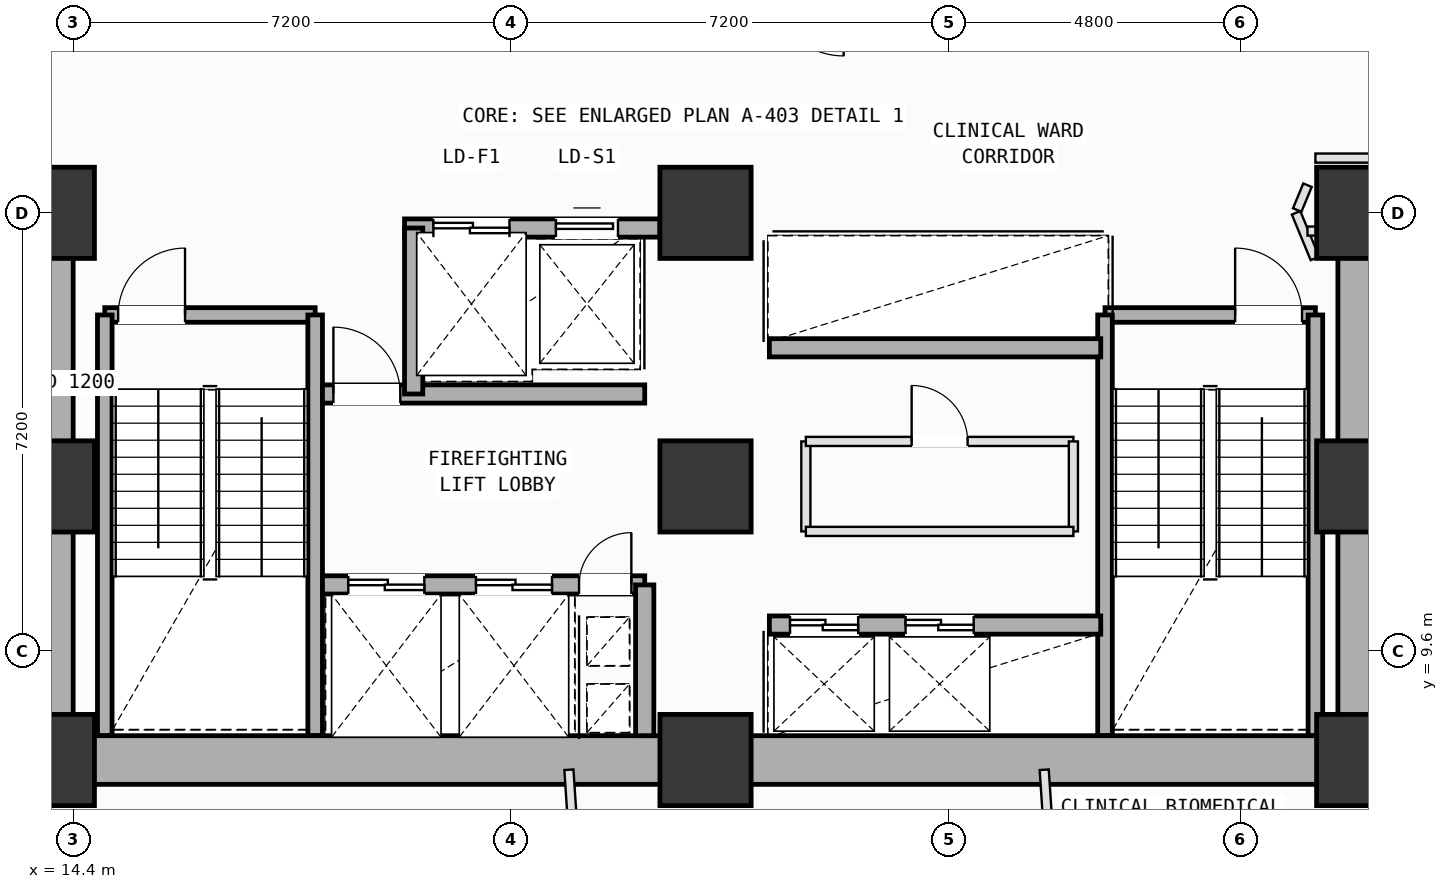
"""IFC4 building model, lengths in metres.
Left out: names, types, materials, properties, quantities, classifications, styles, units other than length and angle.
Written with IfcOpenShell. Run it as: python <this file> out.ifc"""

import sys

from ifc_helpers import new_model, si_unit, direction, frame, frame_2d, origin, origin_2d, place, context, subcontext, project, spatial, rectangle, extrude, element, fill, save


model = new_model("IFC4")
c1 = context("Model", 3, precision=1e-05, world=origin(), true_north=direction((0.0, 1.0)))
c2 = subcontext(c1, "Body", "Model", "MODEL_VIEW")
j1 = project(units=[si_unit("LENGTHUNIT", "METRE"), si_unit("PLANEANGLEUNIT", "RADIAN")], contexts=[c1])
p1 = place(None, origin())
s1 = spatial("IfcSite", under=j1, at=p1, CompositionType="ELEMENT")
p2 = place(p1, origin())
s2 = spatial("IfcBuilding", under=s1, at=p2, CompositionType="ELEMENT")
p3 = place(p2, frame((0.0, 0.0, 39.0)))
s3 = spatial("IfcBuildingStorey", under=s2, at=p3, CompositionType="ELEMENT", Elevation=39.0)
for number, where, z_axis, x_axis in (
    (1, (14.0, 7.8, 0.0), (0.0, 0.0, 1.0), (1.0, 0.0, 0.0)),
    (2, (14.0, 12.3, 0.0), (0.0, 0.0, 1.0), (1.0, 0.0, 0.0)),
    (3, (14.0, 16.8, 0.0), (0.0, 0.0, 1.0), (1.0, 0.0, 0.0)),
    (4, (24.8, 7.8, 0.0), (0.0, 0.0, 1.0), (1.0, 0.0, 0.0)),
    (5, (24.8, 12.3, 0.0), (0.0, 0.0, 1.0), (1.0, 0.0, 0.0)),
    (6, (24.8, 16.8, 0.0), (0.0, 0.0, 1.0), (1.0, 0.0, 0.0)),
    (7, (35.6, 7.8, 0.0), (0.0, 0.0, 1.0), (1.0, 0.0, 0.0)),
    (8, (35.6, 12.3, 0.0), (0.0, 0.0, 1.0), (1.0, 0.0, 0.0)),
    (9, (35.6, 16.8, 0.0), (0.0, 0.0, 1.0), (1.0, 0.0, 0.0)),
):
    element("IfcColumn", number, at=place(p3, frame(where, z_axis=z_axis, x_axis=x_axis)), inside=s3, PredefinedType="COLUMN", context=c2, shape_type="SweptSolid", body=[
        extrude(rectangle(XDim=1.5, YDim=1.5, at=origin_2d()), origin(), (0.0, 0.0, 1.0), 4.0),
    ])
p4 = place(p3, frame((14.92, 15.12, 0.0), z_axis=(0.0, 0.0, 1.0), x_axis=(1.0, 0.0, 0.0)))
e10 = element("IfcWall", 10, at=p4, inside=s3, PredefinedType="SOLIDWALL", context=c2, shape_type="SweptSolid", body=[
    extrude(rectangle(XDim=3.46, YDim=0.24, at=frame_2d((1.73, 0.0))), origin(), (0.0, 0.0, 1.0), 3.78),
])
p5 = place(p4, frame((0.22, 0.0, 0.0)))
e11 = element("IfcOpeningElement", 11, at=p5, cuts=e10, PredefinedType="OPENING", context=c2, shape_type="SweptSolid", body=[
    extrude(rectangle(XDim=1.1, YDim=2.15, at=frame_2d((0.55, 1.075))), frame((0.0, 0.13, 0.0), z_axis=(0.0, -1.0, 0.0), x_axis=(1.0, 0.0, 0.0)), (0.0, 0.0, 1.0), 0.26),
])
for number, where, z_axis, x_axis in (
    (12, (18.38, 15.12, 0.0), (0.0, 0.0, 1.0), (0.0, -1.0, 0.0)),
    (13, (14.92, 8.2, 0.0), (0.0, 0.0, 1.0), (0.0, 1.0, 0.0)),
):
    element("IfcWall", number, at=place(p3, frame(where, z_axis=z_axis, x_axis=x_axis)), inside=s3, PredefinedType="SOLIDWALL", context=c2, shape_type="SweptSolid", body=[
        extrude(rectangle(XDim=6.92, YDim=0.24, at=frame_2d((3.46, 0.0))), origin(), (0.0, 0.0, 1.0), 3.78),
    ])
p6 = place(p3, frame((31.37, 15.12, 0.0), z_axis=(0.0, 0.0, 1.0), x_axis=(1.0, 0.0, 0.0)))
e14 = element("IfcWall", 14, at=p6, inside=s3, PredefinedType="SOLIDWALL", context=c2, shape_type="SweptSolid", body=[
    extrude(rectangle(XDim=3.46, YDim=0.24, at=frame_2d((1.73, 0.0))), origin(), (0.0, 0.0, 1.0), 3.78),
])
p7 = place(p6, frame((2.14, 0.0, 0.0)))
e15 = element("IfcOpeningElement", 15, at=p7, cuts=e14, PredefinedType="OPENING", context=c2, shape_type="SweptSolid", body=[
    extrude(rectangle(XDim=1.1, YDim=2.15, at=frame_2d((0.55, 1.075))), frame((0.0, 0.13, 0.0), z_axis=(0.0, -1.0, 0.0), x_axis=(1.0, 0.0, 0.0)), (0.0, 0.0, 1.0), 0.26),
])
for number, where, z_axis, x_axis in (
    (16, (34.83, 15.12, 0.0), (0.0, 0.0, 1.0), (0.0, -1.0, 0.0)),
    (17, (31.37, 8.2, 0.0), (0.0, 0.0, 1.0), (0.0, 1.0, 0.0)),
):
    element("IfcWall", number, at=place(p3, frame(where, z_axis=z_axis, x_axis=x_axis)), inside=s3, PredefinedType="SOLIDWALL", context=c2, shape_type="SweptSolid", body=[
        extrude(rectangle(XDim=6.92, YDim=0.24, at=frame_2d((3.46, 0.0))), origin(), (0.0, 0.0, 1.0), 3.78),
    ])
for number, where, z_axis, x_axis in (
    (18, (14.0, 7.8, 0.0), (0.0, 0.0, 1.0), (1.0, 0.0, 0.0)),
    (19, (24.8, 7.8, 0.0), (0.0, 0.0, 1.0), (1.0, 0.0, 0.0)),
):
    element("IfcWall", number, at=place(p3, frame(where, z_axis=z_axis, x_axis=x_axis)), inside=s3, PredefinedType="SHEAR", context=c2, shape_type="SweptSolid", body=[
        extrude(rectangle(XDim=10.8, YDim=0.8, at=frame_2d((5.4, 0.0))), origin(), (0.0, 0.0, 1.0), 3.78),
    ])
for number, where, z_axis, x_axis in (
    (20, (35.6, 7.8, 0.0), (0.0, 0.0, 1.0), (0.0, 1.0, 0.0)),
    (21, (14.0, 16.8, 0.0), (0.0, 0.0, 1.0), (0.0, -1.0, 0.0)),
):
    element("IfcWall", number, at=place(p3, frame(where, z_axis=z_axis, x_axis=x_axis)), inside=s3, PredefinedType="SHEAR", context=c2, shape_type="SweptSolid", body=[
        extrude(rectangle(XDim=9.0, YDim=0.8, at=frame_2d((4.5, 0.0))), origin(), (0.0, 0.0, 1.0), 3.78),
    ])
p8 = place(p3, frame((19.85, 16.55, 0.0), z_axis=(0.0, 0.0, 1.0), x_axis=(1.0, 0.0, 0.0)))
e22 = element("IfcWall", 22, at=p8, inside=s3, PredefinedType="SOLIDWALL", context=c2, shape_type="SweptSolid", body=[
    extrude(rectangle(XDim=4.2, YDim=0.3, at=frame_2d((2.1, 0.0))), origin(), (0.0, 0.0, 1.0), 3.78),
])
p9 = place(p8, frame((0.475, 0.0, 0.0)))
e23 = element("IfcOpeningElement", 23, at=p9, cuts=e22, PredefinedType="OPENING", context=c2, shape_type="SweptSolid", body=[
    extrude(rectangle(XDim=1.25, YDim=2.18, at=frame_2d((0.625, 1.09))), frame((0.0, 0.16, 0.0), z_axis=(0.0, -1.0, 0.0), x_axis=(1.0, 0.0, 0.0)), (0.0, 0.0, 1.0), 0.32),
])
p10 = place(p8, frame((2.49, 0.0, 0.0)))
e24 = element("IfcOpeningElement", 24, at=p10, cuts=e22, PredefinedType="OPENING", context=c2, shape_type="SweptSolid", body=[
    extrude(rectangle(XDim=1.02, YDim=2.12, at=frame_2d((0.51, 1.06))), frame((0.0, 0.16, 0.0), z_axis=(0.0, -1.0, 0.0), x_axis=(1.0, 0.0, 0.0)), (0.0, 0.0, 1.0), 0.32),
])
p11 = place(p3, frame((18.5, 10.68, 0.0), z_axis=(0.0, 0.0, 1.0), x_axis=(1.0, 0.0, 0.0)))
e25 = element("IfcWall", 25, at=p11, inside=s3, PredefinedType="SOLIDWALL", context=c2, shape_type="SweptSolid", body=[
    extrude(rectangle(XDim=5.3, YDim=0.3, at=frame_2d((2.65, 0.0))), origin(), (0.0, 0.0, 1.0), 3.78),
])
p12 = place(p11, frame((4.22, 0.0, 0.0)))
e26 = element("IfcOpeningElement", 26, at=p12, cuts=e25, PredefinedType="OPENING", context=c2, shape_type="SweptSolid", body=[
    extrude(rectangle(XDim=0.86, YDim=2.06, at=frame_2d((0.43, 1.03))), frame((0.0, 0.16, 0.0), z_axis=(0.0, -1.0, 0.0), x_axis=(1.0, 0.0, 0.0)), (0.0, 0.0, 1.0), 0.32),
])
p13 = place(p11, frame((0.425, 0.0, 0.0)))
e27 = element("IfcOpeningElement", 27, at=p13, cuts=e25, PredefinedType="OPENING", context=c2, shape_type="SweptSolid", body=[
    extrude(rectangle(XDim=1.25, YDim=2.18, at=frame_2d((0.625, 1.09))), frame((0.0, 0.16, 0.0), z_axis=(0.0, -1.0, 0.0), x_axis=(1.0, 0.0, 0.0)), (0.0, 0.0, 1.0), 0.32),
])
p14 = place(p11, frame((2.525, 0.0, 0.0)))
e28 = element("IfcOpeningElement", 28, at=p14, cuts=e25, PredefinedType="OPENING", context=c2, shape_type="SweptSolid", body=[
    extrude(rectangle(XDim=1.25, YDim=2.18, at=frame_2d((0.625, 1.09))), frame((0.0, 0.16, 0.0), z_axis=(0.0, -1.0, 0.0), x_axis=(1.0, 0.0, 0.0)), (0.0, 0.0, 1.0), 0.32),
])
p15 = place(p3, frame((18.5, 13.82, 0.0), z_axis=(0.0, 0.0, 1.0), x_axis=(1.0, 0.0, 0.0)))
e29 = element("IfcWall", 29, at=p15, inside=s3, PredefinedType="SOLIDWALL", context=c2, shape_type="SweptSolid", body=[
    extrude(rectangle(XDim=5.3, YDim=0.3, at=frame_2d((2.65, 0.0))), origin(), (0.0, 0.0, 1.0), 3.78),
])
p16 = place(p15, frame((0.18, 0.0, 0.0)))
e30 = element("IfcOpeningElement", 30, at=p16, cuts=e29, PredefinedType="OPENING", context=c2, shape_type="SweptSolid", body=[
    extrude(rectangle(XDim=1.1, YDim=2.15, at=frame_2d((0.55, 1.075))), frame((0.0, 0.16, 0.0), z_axis=(0.0, -1.0, 0.0), x_axis=(1.0, 0.0, 0.0)), (0.0, 0.0, 1.0), 0.32),
])
p17 = place(p3, frame((23.8, 8.2, 0.0), z_axis=(0.0, 0.0, 1.0), x_axis=(0.0, 1.0, 0.0)))
e31 = element("IfcWall", 31, at=p17, inside=s3, PredefinedType="SOLIDWALL", context=c2, shape_type="SweptSolid", body=[
    extrude(rectangle(XDim=2.48, YDim=0.3, at=frame_2d((1.24, 0.0))), origin(), (0.0, 0.0, 1.0), 3.78),
])
p18 = place(p3, frame((20.0, 13.82, 0.0), z_axis=(0.0, 0.0, 1.0), x_axis=(0.0, 1.0, 0.0)))
e32 = element("IfcWall", 32, at=p18, inside=s3, PredefinedType="SOLIDWALL", context=c2, shape_type="SweptSolid", body=[
    extrude(rectangle(XDim=2.73, YDim=0.3, at=frame_2d((1.365, 0.0))), origin(), (0.0, 0.0, 1.0), 3.78),
])
p19 = place(p3, frame((25.85, 10.02, 0.0), z_axis=(0.0, 0.0, 1.0), x_axis=(1.0, 0.0, 0.0)))
e33 = element("IfcWall", 33, at=p19, inside=s3, PredefinedType="SOLIDWALL", context=c2, shape_type="SweptSolid", body=[
    extrude(rectangle(XDim=5.45, YDim=0.3, at=frame_2d((2.725, 0.0))), origin(), (0.0, 0.0, 1.0), 3.78),
])
p20 = place(p19, frame((0.34, 0.0, 0.0)))
e34 = element("IfcOpeningElement", 34, at=p20, cuts=e33, PredefinedType="OPENING", context=c2, shape_type="SweptSolid", body=[
    extrude(rectangle(XDim=1.12, YDim=2.15, at=frame_2d((0.56, 1.075))), frame((0.0, 0.16, 0.0), z_axis=(0.0, -1.0, 0.0), x_axis=(1.0, 0.0, 0.0)), (0.0, 0.0, 1.0), 0.32),
])
p21 = place(p19, frame((2.24, 0.0, 0.0)))
e35 = element("IfcOpeningElement", 35, at=p21, cuts=e33, PredefinedType="OPENING", context=c2, shape_type="SweptSolid", body=[
    extrude(rectangle(XDim=1.12, YDim=2.15, at=frame_2d((0.56, 1.075))), frame((0.0, 0.16, 0.0), z_axis=(0.0, -1.0, 0.0), x_axis=(1.0, 0.0, 0.0)), (0.0, 0.0, 1.0), 0.32),
])
p22 = place(p3, frame((25.85, 14.58, 0.0), z_axis=(0.0, 0.0, 1.0), x_axis=(1.0, 0.0, 0.0)))
e36 = element("IfcWall", 36, at=p22, inside=s3, PredefinedType="SOLIDWALL", context=c2, shape_type="SweptSolid", body=[
    extrude(rectangle(XDim=5.45, YDim=0.3, at=frame_2d((2.725, 0.0))), origin(), (0.0, 0.0, 1.0), 3.78),
])
p23 = place(p3, frame((26.45, 11.56, 0.0), z_axis=(0.0, 0.0, 1.0), x_axis=(0.0, 1.0, 0.0)))
e37 = element("IfcWall", 37, at=p23, inside=s3, PredefinedType="PARTITIONING", context=c2, shape_type="SweptSolid", body=[
    extrude(rectangle(XDim=1.48, YDim=0.15, at=frame_2d((0.74, 0.0))), origin(), (0.0, 0.0, 1.0), 3.78),
])
p24 = place(p3, frame((26.45, 13.04, 0.0), z_axis=(0.0, 0.0, 1.0), x_axis=(1.0, 0.0, 0.0)))
e38 = element("IfcWall", 38, at=p24, inside=s3, PredefinedType="PARTITIONING", context=c2, shape_type="SweptSolid", body=[
    extrude(rectangle(XDim=4.4, YDim=0.15, at=frame_2d((2.2, 0.0))), origin(), (0.0, 0.0, 1.0), 3.78),
])
p25 = place(p24, frame((1.74, 0.0, 0.0)))
e39 = element("IfcOpeningElement", 39, at=p25, cuts=e38, PredefinedType="OPENING", context=c2, shape_type="SweptSolid", body=[
    extrude(rectangle(XDim=0.92, YDim=2.1, at=frame_2d((0.46, 1.05))), frame((0.0, 0.085, 0.0), z_axis=(0.0, -1.0, 0.0), x_axis=(1.0, 0.0, 0.0)), (0.0, 0.0, 1.0), 0.17),
])
p26 = place(p3, frame((30.85, 13.04, 0.0), z_axis=(0.0, 0.0, 1.0), x_axis=(0.0, -1.0, 0.0)))
e40 = element("IfcWall", 40, at=p26, inside=s3, PredefinedType="PARTITIONING", context=c2, shape_type="SweptSolid", body=[
    extrude(rectangle(XDim=1.48, YDim=0.15, at=frame_2d((0.74, 0.0))), origin(), (0.0, 0.0, 1.0), 3.78),
])
p27 = place(p3, frame((30.85, 11.56, 0.0), z_axis=(0.0, 0.0, 1.0), x_axis=(-1.0, 0.0, 0.0)))
e41 = element("IfcWall", 41, at=p27, inside=s3, PredefinedType="PARTITIONING", context=c2, shape_type="SweptSolid", body=[
    extrude(rectangle(XDim=4.4, YDim=0.15, at=frame_2d((2.2, 0.0))), origin(), (0.0, 0.0, 1.0), 3.78),
])
p28 = place(p3, frame((22.553, 7.64, 0.0), z_axis=(0.0, 0.0, 1.0), x_axis=(0.066402954643, -0.997792888136, 0.0)))
e42 = element("IfcWall", 42, at=p28, inside=s3, PredefinedType="PARTITIONING", context=c2, shape_type="SweptSolid", body=[
    extrude(rectangle(XDim=5.725, YDim=0.15, at=frame_2d((2.862, 0.0))), origin(), (0.0, 0.0, 1.0), 3.78),
])
p29 = place(p28, frame((2.583, 0.0, 0.0)))
e43 = element("IfcOpeningElement", 43, at=p29, cuts=e42, PredefinedType="OPENING", context=c2, shape_type="SweptSolid", body=[
    extrude(rectangle(XDim=0.86, YDim=2.06, at=frame_2d((0.43, 1.03))), frame((0.0, 0.085, 0.0), z_axis=(0.0, -1.0, 0.0), x_axis=(1.0, 0.0, 0.0)), (0.0, 0.0, 1.0), 0.17),
])
p30 = place(p3, frame((30.37, 7.64, 0.0), z_axis=(0.0, 0.0, 1.0), x_axis=(0.066260678422, -0.997802346407, 0.0)))
e44 = element("IfcWall", 44, at=p30, inside=s3, PredefinedType="PARTITIONING", context=c2, shape_type="SweptSolid", body=[
    extrude(rectangle(XDim=5.206, YDim=0.15, at=frame_2d((2.603, 0.0))), origin(), (0.0, 0.0, 1.0), 3.78),
])
p31 = place(p30, frame((2.324, 0.0, 0.0)))
e45 = element("IfcOpeningElement", 45, at=p31, cuts=e44, PredefinedType="OPENING", context=c2, shape_type="SweptSolid", body=[
    extrude(rectangle(XDim=0.86, YDim=2.06, at=frame_2d((0.43, 1.03))), frame((0.0, 0.085, 0.0), z_axis=(0.0, -1.0, 0.0), x_axis=(1.0, 0.0, 0.0)), (0.0, 0.0, 1.0), 0.17),
])
p32 = place(p3, frame((34.822, 16.05, 0.0), z_axis=(0.0, 0.0, 1.0), x_axis=(-0.382050639738, 0.924141389981, 0.0)))
e46 = element("IfcWall", 46, at=p32, inside=s3, PredefinedType="PARTITIONING", context=c2, shape_type="SweptSolid", body=[
    extrude(rectangle(XDim=0.812, YDim=0.15, at=frame_2d((0.406, 0.0))), origin(), (0.0, 0.0, 1.0), 3.78),
])
p33 = place(p3, frame((34.531, 16.846, 0.0), z_axis=(0.0, 0.0, 1.0), x_axis=(0.382612233621, 0.923909020782, 0.0)))
e47 = element("IfcWall", 47, at=p33, inside=s3, PredefinedType="PARTITIONING", context=c2, shape_type="SweptSolid", body=[
    extrude(rectangle(XDim=0.442, YDim=0.15, at=frame_2d((0.221, 0.0))), origin(), (0.0, 0.0, 1.0), 3.78),
])
p34 = place(p3, frame((34.7, 16.5, 0.0), z_axis=(0.0, 0.0, 1.0), x_axis=(1.0, 0.0, 0.0)))
e48 = element("IfcWall", 48, at=p34, inside=s3, PredefinedType="PARTITIONING", context=c2, shape_type="SweptSolid", body=[
    extrude(rectangle(XDim=0.525, YDim=0.15, at=frame_2d((0.263, 0.0))), origin(), (0.0, 0.0, 1.0), 2.865),
])
p35 = place(p3, frame((36.45, 17.7, 0.0), z_axis=(0.0, 0.0, 1.0), x_axis=(-1.0, 0.0, 0.0)))
e49 = element("IfcWall", 49, at=p35, inside=s3, PredefinedType="PARTITIONING", context=c2, shape_type="SweptSolid", body=[
    extrude(rectangle(XDim=1.62, YDim=0.15, at=frame_2d((0.81, 0.0))), origin(), (0.0, 0.0, 1.0), 3.78),
])
p36 = place(p5, origin())
e50 = element("IfcDoor", 50, at=p36, inside=s3, OperationType="SINGLE_SWING_RIGHT", PredefinedType="DOOR", context=c2, shape_type="SweptSolid", body=[
    extrude(rectangle(XDim=1.1, YDim=2.15, at=frame_2d((0.55, 1.075))), frame((0.0, 0.025, 0.0), z_axis=(0.0, -1.0, 0.0), x_axis=(1.0, 0.0, 0.0)), (0.0, 0.0, 1.0), 0.05),
])
fill(e11, e50)
p37 = place(p7, origin())
e51 = element("IfcDoor", 51, at=p37, inside=s3, OperationType="SINGLE_SWING_LEFT", PredefinedType="DOOR", context=c2, shape_type="SweptSolid", body=[
    extrude(rectangle(XDim=1.1, YDim=2.15, at=frame_2d((0.55, 1.075))), frame((0.0, 0.025, 0.0), z_axis=(0.0, -1.0, 0.0), x_axis=(1.0, 0.0, 0.0)), (0.0, 0.0, 1.0), 0.05),
])
fill(e15, e51)
p38 = place(p12, origin())
e52 = element("IfcDoor", 52, at=p38, inside=s3, OperationType="SINGLE_SWING_RIGHT", PredefinedType="DOOR", context=c2, shape_type="SweptSolid", body=[
    extrude(rectangle(XDim=0.86, YDim=2.06, at=frame_2d((0.43, 1.03))), frame((0.0, 0.025, 0.0), z_axis=(0.0, -1.0, 0.0), x_axis=(1.0, 0.0, 0.0)), (0.0, 0.0, 1.0), 0.05),
])
fill(e26, e52)
p39 = place(p16, origin())
e53 = element("IfcDoor", 53, at=p39, inside=s3, OperationType="SINGLE_SWING_LEFT", PredefinedType="DOOR", context=c2, shape_type="SweptSolid", body=[
    extrude(rectangle(XDim=1.1, YDim=2.15, at=frame_2d((0.55, 1.075))), frame((0.0, 0.025, 0.0), z_axis=(0.0, -1.0, 0.0), x_axis=(1.0, 0.0, 0.0)), (0.0, 0.0, 1.0), 0.05),
])
fill(e30, e53)
p40 = place(p13, origin())
e54 = element("IfcDoor", 54, at=p40, inside=s3, OperationType="DOUBLE_DOOR_SLIDING", PredefinedType="DOOR", context=c2, shape_type="SweptSolid", body=[
    extrude(rectangle(XDim=1.25, YDim=2.18, at=frame_2d((0.625, 1.09))), frame((0.0, 0.025, 0.0), z_axis=(0.0, -1.0, 0.0), x_axis=(1.0, 0.0, 0.0)), (0.0, 0.0, 1.0), 0.05),
])
fill(e27, e54)
p41 = place(p14, origin())
e55 = element("IfcDoor", 55, at=p41, inside=s3, OperationType="DOUBLE_DOOR_SLIDING", PredefinedType="DOOR", context=c2, shape_type="SweptSolid", body=[
    extrude(rectangle(XDim=1.25, YDim=2.18, at=frame_2d((0.625, 1.09))), frame((0.0, 0.025, 0.0), z_axis=(0.0, -1.0, 0.0), x_axis=(1.0, 0.0, 0.0)), (0.0, 0.0, 1.0), 0.05),
])
fill(e28, e55)
p42 = place(p20, origin())
e56 = element("IfcDoor", 56, at=p42, inside=s3, OperationType="DOUBLE_DOOR_SLIDING", PredefinedType="DOOR", context=c2, shape_type="SweptSolid", body=[
    extrude(rectangle(XDim=1.12, YDim=2.15, at=frame_2d((0.56, 1.075))), frame((0.0, 0.025, 0.0), z_axis=(0.0, -1.0, 0.0), x_axis=(1.0, 0.0, 0.0)), (0.0, 0.0, 1.0), 0.05),
])
fill(e34, e56)
p43 = place(p21, origin())
e57 = element("IfcDoor", 57, at=p43, inside=s3, OperationType="DOUBLE_DOOR_SLIDING", PredefinedType="DOOR", context=c2, shape_type="SweptSolid", body=[
    extrude(rectangle(XDim=1.12, YDim=2.15, at=frame_2d((0.56, 1.075))), frame((0.0, 0.025, 0.0), z_axis=(0.0, -1.0, 0.0), x_axis=(1.0, 0.0, 0.0)), (0.0, 0.0, 1.0), 0.05),
])
fill(e35, e57)
p44 = place(p9, origin())
e58 = element("IfcDoor", 58, at=p44, inside=s3, OperationType="DOUBLE_DOOR_SLIDING", PredefinedType="DOOR", context=c2, shape_type="SweptSolid", body=[
    extrude(rectangle(XDim=1.25, YDim=2.18, at=frame_2d((0.625, 1.09))), frame((0.0, 0.025, 0.0), z_axis=(0.0, -1.0, 0.0), x_axis=(1.0, 0.0, 0.0)), (0.0, 0.0, 1.0), 0.05),
])
fill(e23, e58)
p45 = place(p10, origin())
e59 = element("IfcDoor", 59, at=p45, inside=s3, OperationType="SLIDING_TO_LEFT", PredefinedType="DOOR", context=c2, shape_type="SweptSolid", body=[
    extrude(rectangle(XDim=1.02, YDim=2.12, at=frame_2d((0.51, 1.06))), frame((0.0, 0.025, 0.0), z_axis=(0.0, -1.0, 0.0), x_axis=(1.0, 0.0, 0.0)), (0.0, 0.0, 1.0), 0.05),
])
fill(e24, e59)
p46 = place(p25, origin())
e60 = element("IfcDoor", 60, at=p46, inside=s3, OperationType="SINGLE_SWING_LEFT", PredefinedType="DOOR", context=c2, shape_type="SweptSolid", body=[
    extrude(rectangle(XDim=0.92, YDim=2.1, at=frame_2d((0.46, 1.05))), frame((0.0, 0.025, 0.0), z_axis=(0.0, -1.0, 0.0), x_axis=(1.0, 0.0, 0.0)), (0.0, 0.0, 1.0), 0.05),
])
fill(e39, e60)
save(model, sys.argv[1])
